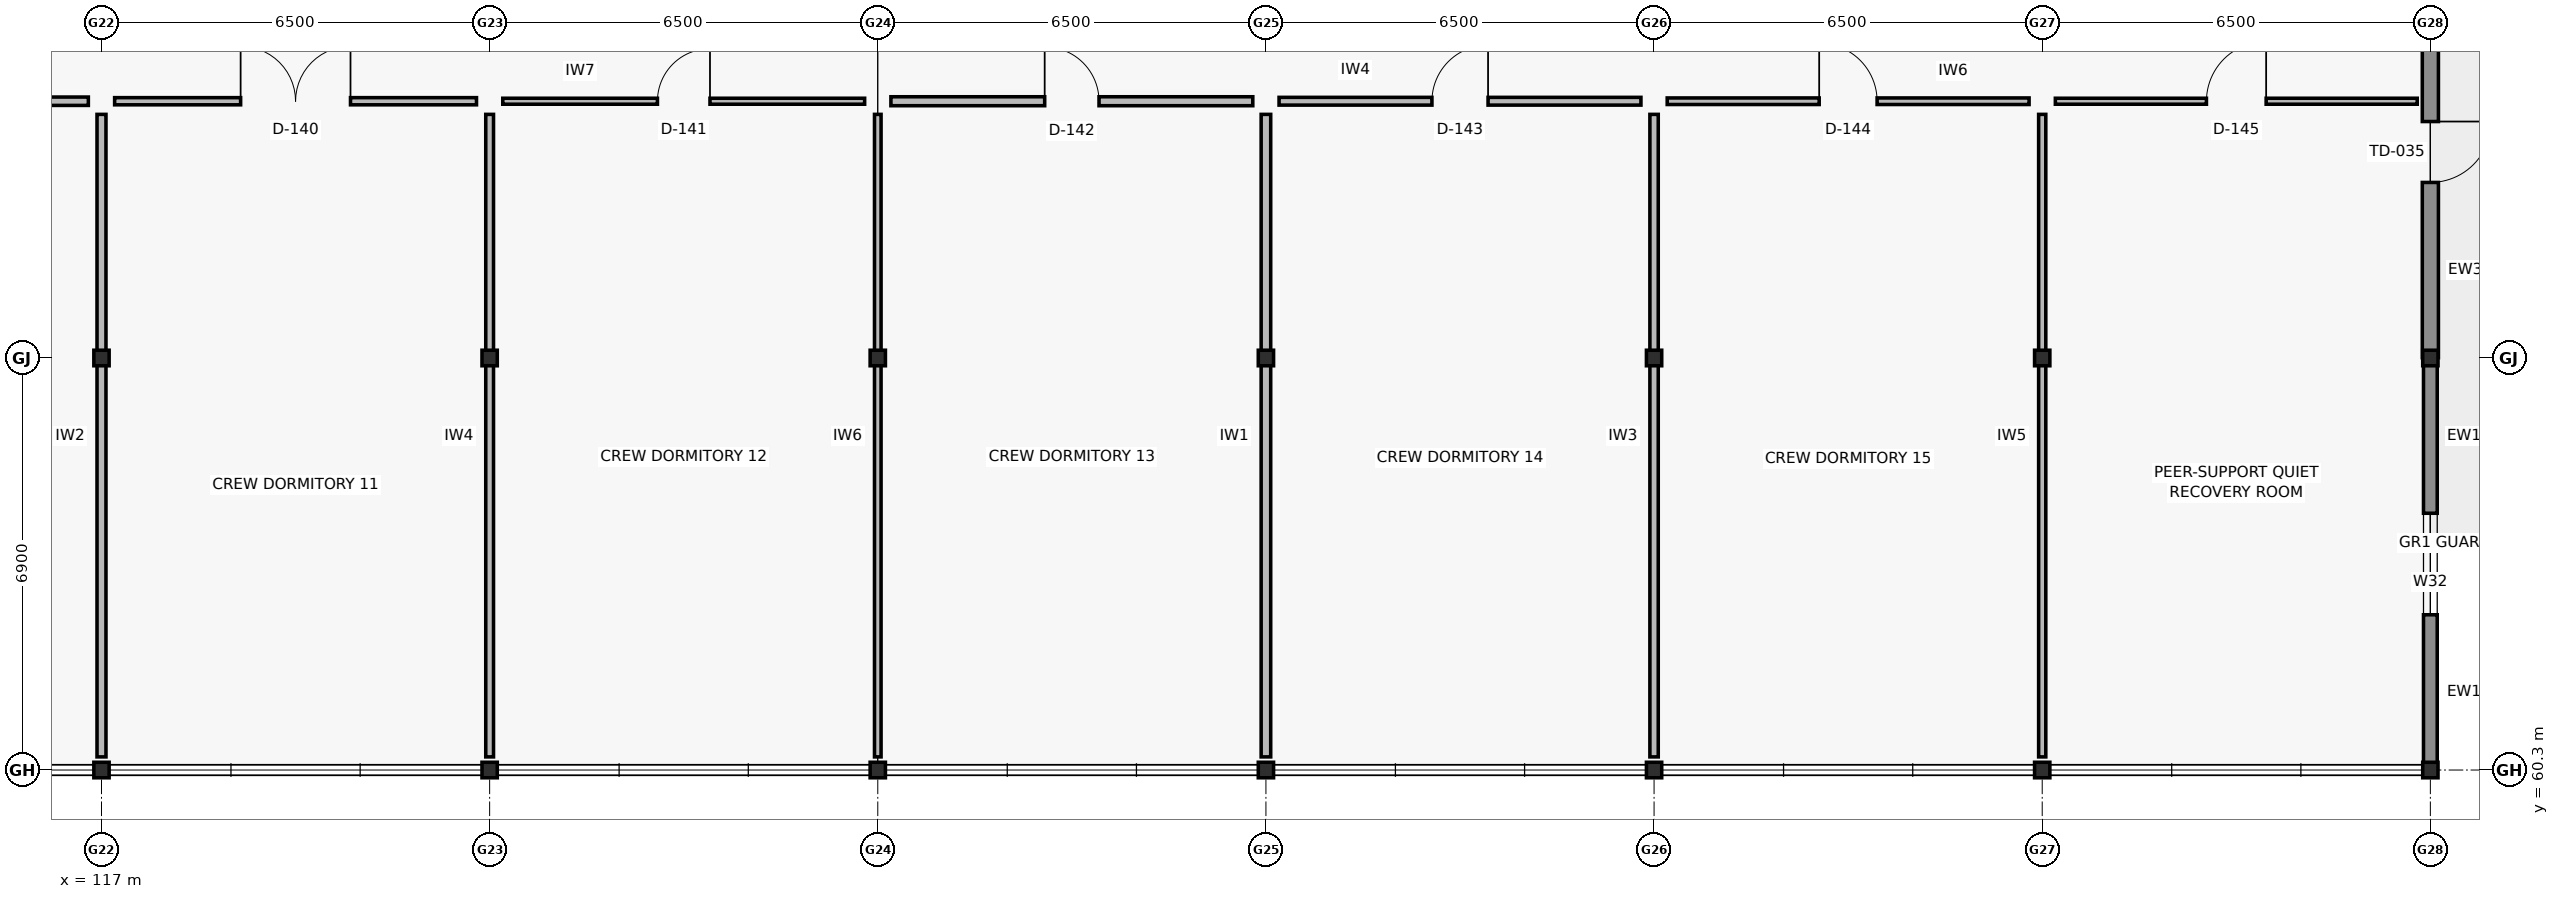
"""IFC4 building model, lengths in metres.
Left out: names, types, materials, properties, quantities, classifications, styles, units other than length and angle.
Written with IfcOpenShell. Run it as: python <this file> out.ifc"""

import sys

from ifc_helpers import new_model, si_unit, direction, frame, frame_2d, origin, origin_2d, place, context, subcontext, project, spatial, rectangle, i_section, extrude, element, fill, save


model = new_model("IFC4")
c1 = context("Model", 3, precision=1e-05, world=origin(), true_north=direction((0.0, 1.0)))
c2 = subcontext(c1, "Body", "Model", "MODEL_VIEW")
j1 = project(units=[si_unit("LENGTHUNIT", "METRE"), si_unit("PLANEANGLEUNIT", "RADIAN")], contexts=[c1])
p1 = place(None, origin())
s1 = spatial("IfcSite", under=j1, at=p1, CompositionType="ELEMENT")
p2 = place(p1, origin())
s2 = spatial("IfcBuilding", under=s1, at=p2, CompositionType="ELEMENT")
p3 = place(p2, frame((0.0, 0.0, 13.5)))
s3 = spatial("IfcBuildingStorey", under=s2, at=p3, CompositionType="ELEMENT", Elevation=13.5)
for number, where, z_axis, x_axis in (
    (1, (117.0, 60.3, 0.0), (0.0, 0.0, 1.0), (1.0, 0.0, 0.0)),
    (2, (117.0, 67.2, 0.0), (0.0, 0.0, 1.0), (1.0, 0.0, 0.0)),
    (3, (123.5, 60.3, 0.0), (0.0, 0.0, 1.0), (1.0, 0.0, 0.0)),
    (4, (123.5, 67.2, 0.0), (0.0, 0.0, 1.0), (1.0, 0.0, 0.0)),
    (5, (130.0, 60.3, 0.0), (0.0, 0.0, 1.0), (1.0, 0.0, 0.0)),
    (6, (130.0, 67.2, 0.0), (0.0, 0.0, 1.0), (1.0, 0.0, 0.0)),
    (7, (136.5, 60.3, 0.0), (0.0, 0.0, 1.0), (1.0, 0.0, 0.0)),
    (8, (136.5, 67.2, 0.0), (0.0, 0.0, 1.0), (1.0, 0.0, 0.0)),
    (9, (143.0, 60.3, 0.0), (0.0, 0.0, 1.0), (1.0, 0.0, 0.0)),
    (10, (143.0, 67.2, 0.0), (0.0, 0.0, 1.0), (1.0, 0.0, 0.0)),
    (11, (149.5, 60.3, 0.0), (0.0, 0.0, 1.0), (1.0, 0.0, 0.0)),
    (12, (149.5, 67.2, 0.0), (0.0, 0.0, 1.0), (1.0, 0.0, 0.0)),
    (13, (156.0, 60.3, 0.0), (0.0, 0.0, 1.0), (1.0, 0.0, 0.0)),
    (14, (156.0, 67.2, 0.0), (0.0, 0.0, 1.0), (1.0, 0.0, 0.0)),
):
    element("IfcColumn", number, at=place(p3, frame(where, z_axis=z_axis, x_axis=x_axis)), inside=s3, PredefinedType="COLUMN", context=c2, shape_type="SweptSolid", body=[
        extrude(i_section(OverallWidth=0.256, OverallDepth=0.26, WebThickness=0.01, FlangeThickness=0.017, FilletRadius=0.013, at=origin_2d()), origin(), (0.0, 0.0, 1.0), 3.9),
    ])
p4 = place(p3, frame((156.0, 67.195, 0.0), z_axis=(0.0, 0.0, 1.0), x_axis=(0.0, -1.0, 0.0)))
e15 = element("IfcWall", 15, at=p4, inside=s3, PredefinedType="SOLIDWALL", context=c2, shape_type="SweptSolid", body=[
    extrude(rectangle(XDim=6.89, YDim=0.23, at=frame_2d((3.445, 0.0))), origin(), (0.0, 0.0, 1.0), 3.02),
])
p5 = place(p4, frame((2.595, 0.0, 0.8)))
e16 = element("IfcOpeningElement", 16, at=p5, cuts=e15, PredefinedType="OPENING", context=c2, shape_type="SweptSolid", body=[
    extrude(rectangle(XDim=1.7, YDim=1.25, at=frame_2d((0.85, 0.625))), frame((0.0, 0.125, 0.0), z_axis=(0.0, -1.0, 0.0), x_axis=(1.0, 0.0, 0.0)), (0.0, 0.0, 1.0), 0.25),
])
p6 = place(p3, frame((156.0, 74.095, 0.0), z_axis=(0.0, 0.0, 1.0), x_axis=(0.0, -1.0, 0.0)))
e17 = element("IfcWall", 17, at=p6, inside=s3, PredefinedType="SOLIDWALL", context=c2, shape_type="SweptSolid", body=[
    extrude(rectangle(XDim=6.89, YDim=0.27, at=frame_2d((3.445, 0.0))), origin(), (0.0, 0.0, 1.0), 3.02),
])
p7 = place(p6, frame((2.935, 0.0, 0.0)))
e18 = element("IfcOpeningElement", 18, at=p7, cuts=e17, PredefinedType="OPENING", context=c2, shape_type="SweptSolid", body=[
    extrude(rectangle(XDim=1.02, YDim=2.14, at=frame_2d((0.51, 1.07))), frame((0.0, 0.145, 0.0), z_axis=(0.0, -1.0, 0.0), x_axis=(1.0, 0.0, 0.0)), (0.0, 0.0, 1.0), 0.29),
])
p8 = place(p3, frame((117.0, 60.52, 0.0), z_axis=(0.0, 0.0, 1.0), x_axis=(0.0, 1.0, 0.0)))
e19 = element("IfcWall", 19, at=p8, inside=s3, PredefinedType="PARTITIONING", context=c2, shape_type="SweptSolid", body=[
    extrude(rectangle(XDim=10.76, YDim=0.15, at=frame_2d((5.38, 0.0))), origin(), (0.0, 0.0, 1.0), 3.0),
])
p9 = place(p3, frame((110.72, 71.5, 0.0), z_axis=(0.0, 0.0, 1.0), x_axis=(1.0, 0.0, 0.0)))
e20 = element("IfcWall", 20, at=p9, inside=s3, PredefinedType="PARTITIONING", context=c2, shape_type="SweptSolid", body=[
    extrude(rectangle(XDim=6.06, YDim=0.14, at=frame_2d((3.03, 0.0))), origin(), (0.0, 0.0, 1.0), 3.0),
])
p10 = place(p9, frame((2.16, 0.0, 0.0)))
e21 = element("IfcOpeningElement", 21, at=p10, cuts=e20, PredefinedType="OPENING", context=c2, shape_type="SweptSolid", body=[
    extrude(rectangle(XDim=1.74, YDim=2.2, at=frame_2d((0.87, 1.1))), frame((0.0, 0.08, 0.0), z_axis=(0.0, -1.0, 0.0), x_axis=(1.0, 0.0, 0.0)), (0.0, 0.0, 1.0), 0.16),
])
p11 = place(p3, frame((123.5, 60.52, 0.0), z_axis=(0.0, 0.0, 1.0), x_axis=(0.0, 1.0, 0.0)))
e22 = element("IfcWall", 22, at=p11, inside=s3, PredefinedType="PARTITIONING", context=c2, shape_type="SweptSolid", body=[
    extrude(rectangle(XDim=10.76, YDim=0.13, at=frame_2d((5.38, 0.0))), origin(), (0.0, 0.0, 1.0), 3.0),
])
p12 = place(p3, frame((117.22, 71.5, 0.0), z_axis=(0.0, 0.0, 1.0), x_axis=(1.0, 0.0, 0.0)))
e23 = element("IfcWall", 23, at=p12, inside=s3, PredefinedType="PARTITIONING", context=c2, shape_type="SweptSolid", body=[
    extrude(rectangle(XDim=6.06, YDim=0.12, at=frame_2d((3.03, 0.0))), origin(), (0.0, 0.0, 1.0), 3.0),
])
p13 = place(p12, frame((2.11, 0.0, 0.0)))
e24 = element("IfcOpeningElement", 24, at=p13, cuts=e23, PredefinedType="OPENING", context=c2, shape_type="SweptSolid", body=[
    extrude(rectangle(XDim=1.84, YDim=2.22, at=frame_2d((0.92, 1.11))), frame((0.0, 0.07, 0.0), z_axis=(0.0, -1.0, 0.0), x_axis=(1.0, 0.0, 0.0)), (0.0, 0.0, 1.0), 0.14),
])
p14 = place(p3, frame((130.0, 60.52, 0.0), z_axis=(0.0, 0.0, 1.0), x_axis=(0.0, 1.0, 0.0)))
e25 = element("IfcWall", 25, at=p14, inside=s3, PredefinedType="PARTITIONING", context=c2, shape_type="SweptSolid", body=[
    extrude(rectangle(XDim=10.76, YDim=0.11, at=frame_2d((5.38, 0.0))), origin(), (0.0, 0.0, 1.0), 3.0),
])
p15 = place(p3, frame((123.72, 71.5, 0.0), z_axis=(0.0, 0.0, 1.0), x_axis=(1.0, 0.0, 0.0)))
e26 = element("IfcWall", 26, at=p15, inside=s3, PredefinedType="PARTITIONING", context=c2, shape_type="SweptSolid", body=[
    extrude(rectangle(XDim=6.06, YDim=0.1, at=frame_2d((3.03, 0.0))), origin(), (0.0, 0.0, 1.0), 3.0),
])
p16 = place(p15, frame((2.59, 0.0, 0.0)))
e27 = element("IfcOpeningElement", 27, at=p16, cuts=e26, PredefinedType="OPENING", context=c2, shape_type="SweptSolid", body=[
    extrude(rectangle(XDim=0.88, YDim=2.04, at=frame_2d((0.44, 1.02))), frame((0.0, 0.06, 0.0), z_axis=(0.0, -1.0, 0.0), x_axis=(1.0, 0.0, 0.0)), (0.0, 0.0, 1.0), 0.12),
])
p17 = place(p3, frame((136.5, 60.52, 0.0), z_axis=(0.0, 0.0, 1.0), x_axis=(0.0, 1.0, 0.0)))
e28 = element("IfcWall", 28, at=p17, inside=s3, PredefinedType="PARTITIONING", context=c2, shape_type="SweptSolid", body=[
    extrude(rectangle(XDim=10.76, YDim=0.16, at=frame_2d((5.38, 0.0))), origin(), (0.0, 0.0, 1.0), 3.0),
])
p18 = place(p3, frame((130.22, 71.5, 0.0), z_axis=(0.0, 0.0, 1.0), x_axis=(1.0, 0.0, 0.0)))
e29 = element("IfcWall", 29, at=p18, inside=s3, PredefinedType="PARTITIONING", context=c2, shape_type="SweptSolid", body=[
    extrude(rectangle(XDim=6.06, YDim=0.15, at=frame_2d((3.03, 0.0))), origin(), (0.0, 0.0, 1.0), 3.0),
])
p19 = place(p18, frame((2.575, 0.0, 0.0)))
e30 = element("IfcOpeningElement", 30, at=p19, cuts=e29, PredefinedType="OPENING", context=c2, shape_type="SweptSolid", body=[
    extrude(rectangle(XDim=0.91, YDim=2.06, at=frame_2d((0.455, 1.03))), frame((0.0, 0.085, 0.0), z_axis=(0.0, -1.0, 0.0), x_axis=(1.0, 0.0, 0.0)), (0.0, 0.0, 1.0), 0.17),
])
p20 = place(p3, frame((143.0, 60.52, 0.0), z_axis=(0.0, 0.0, 1.0), x_axis=(0.0, 1.0, 0.0)))
e31 = element("IfcWall", 31, at=p20, inside=s3, PredefinedType="PARTITIONING", context=c2, shape_type="SweptSolid", body=[
    extrude(rectangle(XDim=10.76, YDim=0.14, at=frame_2d((5.38, 0.0))), origin(), (0.0, 0.0, 1.0), 3.0),
])
p21 = place(p3, frame((136.72, 71.5, 0.0), z_axis=(0.0, 0.0, 1.0), x_axis=(1.0, 0.0, 0.0)))
e32 = element("IfcWall", 32, at=p21, inside=s3, PredefinedType="PARTITIONING", context=c2, shape_type="SweptSolid", body=[
    extrude(rectangle(XDim=6.06, YDim=0.13, at=frame_2d((3.03, 0.0))), origin(), (0.0, 0.0, 1.0), 3.0),
])
p22 = place(p21, frame((2.56, 0.0, 0.0)))
e33 = element("IfcOpeningElement", 33, at=p22, cuts=e32, PredefinedType="OPENING", context=c2, shape_type="SweptSolid", body=[
    extrude(rectangle(XDim=0.94, YDim=2.08, at=frame_2d((0.47, 1.04))), frame((0.0, 0.075, 0.0), z_axis=(0.0, -1.0, 0.0), x_axis=(1.0, 0.0, 0.0)), (0.0, 0.0, 1.0), 0.15),
])
p23 = place(p3, frame((149.5, 60.52, 0.0), z_axis=(0.0, 0.0, 1.0), x_axis=(0.0, 1.0, 0.0)))
e34 = element("IfcWall", 34, at=p23, inside=s3, PredefinedType="PARTITIONING", context=c2, shape_type="SweptSolid", body=[
    extrude(rectangle(XDim=10.76, YDim=0.12, at=frame_2d((5.38, 0.0))), origin(), (0.0, 0.0, 1.0), 3.0),
])
p24 = place(p3, frame((143.22, 71.5, 0.0), z_axis=(0.0, 0.0, 1.0), x_axis=(1.0, 0.0, 0.0)))
e35 = element("IfcWall", 35, at=p24, inside=s3, PredefinedType="PARTITIONING", context=c2, shape_type="SweptSolid", body=[
    extrude(rectangle(XDim=6.06, YDim=0.11, at=frame_2d((3.03, 0.0))), origin(), (0.0, 0.0, 1.0), 3.0),
])
p25 = place(p24, frame((2.545, 0.0, 0.0)))
e36 = element("IfcOpeningElement", 36, at=p25, cuts=e35, PredefinedType="OPENING", context=c2, shape_type="SweptSolid", body=[
    extrude(rectangle(XDim=0.97, YDim=2.1, at=frame_2d((0.485, 1.05))), frame((0.0, 0.065, 0.0), z_axis=(0.0, -1.0, 0.0), x_axis=(1.0, 0.0, 0.0)), (0.0, 0.0, 1.0), 0.13),
])
p26 = place(p3, frame((149.72, 71.5, 0.0), z_axis=(0.0, 0.0, 1.0), x_axis=(1.0, 0.0, 0.0)))
e37 = element("IfcWall", 37, at=p26, inside=s3, PredefinedType="PARTITIONING", context=c2, shape_type="SweptSolid", body=[
    extrude(rectangle(XDim=6.06, YDim=0.1, at=frame_2d((3.03, 0.0))), origin(), (0.0, 0.0, 1.0), 3.0),
])
p27 = place(p26, frame((2.53, 0.0, 0.0)))
e38 = element("IfcOpeningElement", 38, at=p27, cuts=e37, PredefinedType="OPENING", context=c2, shape_type="SweptSolid", body=[
    extrude(rectangle(XDim=1.0, YDim=2.12, at=frame_2d((0.5, 1.06))), frame((0.0, 0.06, 0.0), z_axis=(0.0, -1.0, 0.0), x_axis=(1.0, 0.0, 0.0)), (0.0, 0.0, 1.0), 0.12),
])
p28 = place(p5, origin())
e39 = element("IfcWindow", 39, at=p28, inside=s3, PartitioningType="DOUBLE_PANEL_VERTICAL", PredefinedType="WINDOW", context=c2, shape_type="SweptSolid", body=[
    extrude(rectangle(XDim=1.7, YDim=1.25, at=frame_2d((0.85, 0.625))), frame((0.0, 0.03, 0.0), z_axis=(0.0, -1.0, 0.0), x_axis=(1.0, 0.0, 0.0)), (0.0, 0.0, 1.0), 0.06),
])
fill(e16, e39)
p29 = place(p7, origin())
e40 = element("IfcDoor", 40, at=p29, inside=s3, OperationType="SINGLE_SWING_LEFT", PredefinedType="DOOR", context=c2, shape_type="SweptSolid", body=[
    extrude(rectangle(XDim=1.02, YDim=2.14, at=frame_2d((0.51, 1.07))), frame((0.0, 0.025, 0.0), z_axis=(0.0, -1.0, 0.0), x_axis=(1.0, 0.0, 0.0)), (0.0, 0.0, 1.0), 0.05),
])
fill(e18, e40)
p30 = place(p13, origin())
e41 = element("IfcDoor", 41, at=p30, inside=s3, OperationType="DOUBLE_DOOR_SINGLE_SWING", PredefinedType="DOOR", context=c2, shape_type="SweptSolid", body=[
    extrude(rectangle(XDim=1.84, YDim=2.22, at=frame_2d((0.92, 1.11))), frame((0.0, 0.025, 0.0), z_axis=(0.0, -1.0, 0.0), x_axis=(1.0, 0.0, 0.0)), (0.0, 0.0, 1.0), 0.05),
])
fill(e24, e41)
p31 = place(p16, origin())
e42 = element("IfcDoor", 42, at=p31, inside=s3, OperationType="SINGLE_SWING_RIGHT", PredefinedType="DOOR", context=c2, shape_type="SweptSolid", body=[
    extrude(rectangle(XDim=0.88, YDim=2.04, at=frame_2d((0.44, 1.02))), frame((0.0, 0.025, 0.0), z_axis=(0.0, -1.0, 0.0), x_axis=(1.0, 0.0, 0.0)), (0.0, 0.0, 1.0), 0.05),
])
fill(e27, e42)
p32 = place(p19, origin())
e43 = element("IfcDoor", 43, at=p32, inside=s3, OperationType="SINGLE_SWING_LEFT", PredefinedType="DOOR", context=c2, shape_type="SweptSolid", body=[
    extrude(rectangle(XDim=0.91, YDim=2.06, at=frame_2d((0.455, 1.03))), frame((0.0, 0.025, 0.0), z_axis=(0.0, -1.0, 0.0), x_axis=(1.0, 0.0, 0.0)), (0.0, 0.0, 1.0), 0.05),
])
fill(e30, e43)
p33 = place(p22, origin())
e44 = element("IfcDoor", 44, at=p33, inside=s3, OperationType="SINGLE_SWING_RIGHT", PredefinedType="DOOR", context=c2, shape_type="SweptSolid", body=[
    extrude(rectangle(XDim=0.94, YDim=2.08, at=frame_2d((0.47, 1.04))), frame((0.0, 0.025, 0.0), z_axis=(0.0, -1.0, 0.0), x_axis=(1.0, 0.0, 0.0)), (0.0, 0.0, 1.0), 0.05),
])
fill(e33, e44)
p34 = place(p25, origin())
e45 = element("IfcDoor", 45, at=p34, inside=s3, OperationType="SINGLE_SWING_LEFT", PredefinedType="DOOR", context=c2, shape_type="SweptSolid", body=[
    extrude(rectangle(XDim=0.97, YDim=2.1, at=frame_2d((0.485, 1.05))), frame((0.0, 0.025, 0.0), z_axis=(0.0, -1.0, 0.0), x_axis=(1.0, 0.0, 0.0)), (0.0, 0.0, 1.0), 0.05),
])
fill(e36, e45)
p35 = place(p27, origin())
e46 = element("IfcDoor", 46, at=p35, inside=s3, OperationType="SINGLE_SWING_RIGHT", PredefinedType="DOOR", context=c2, shape_type="SweptSolid", body=[
    extrude(rectangle(XDim=1.0, YDim=2.12, at=frame_2d((0.5, 1.06))), frame((0.0, 0.025, 0.0), z_axis=(0.0, -1.0, 0.0), x_axis=(1.0, 0.0, 0.0)), (0.0, 0.0, 1.0), 0.05),
])
fill(e38, e46)
save(model, sys.argv[1])
